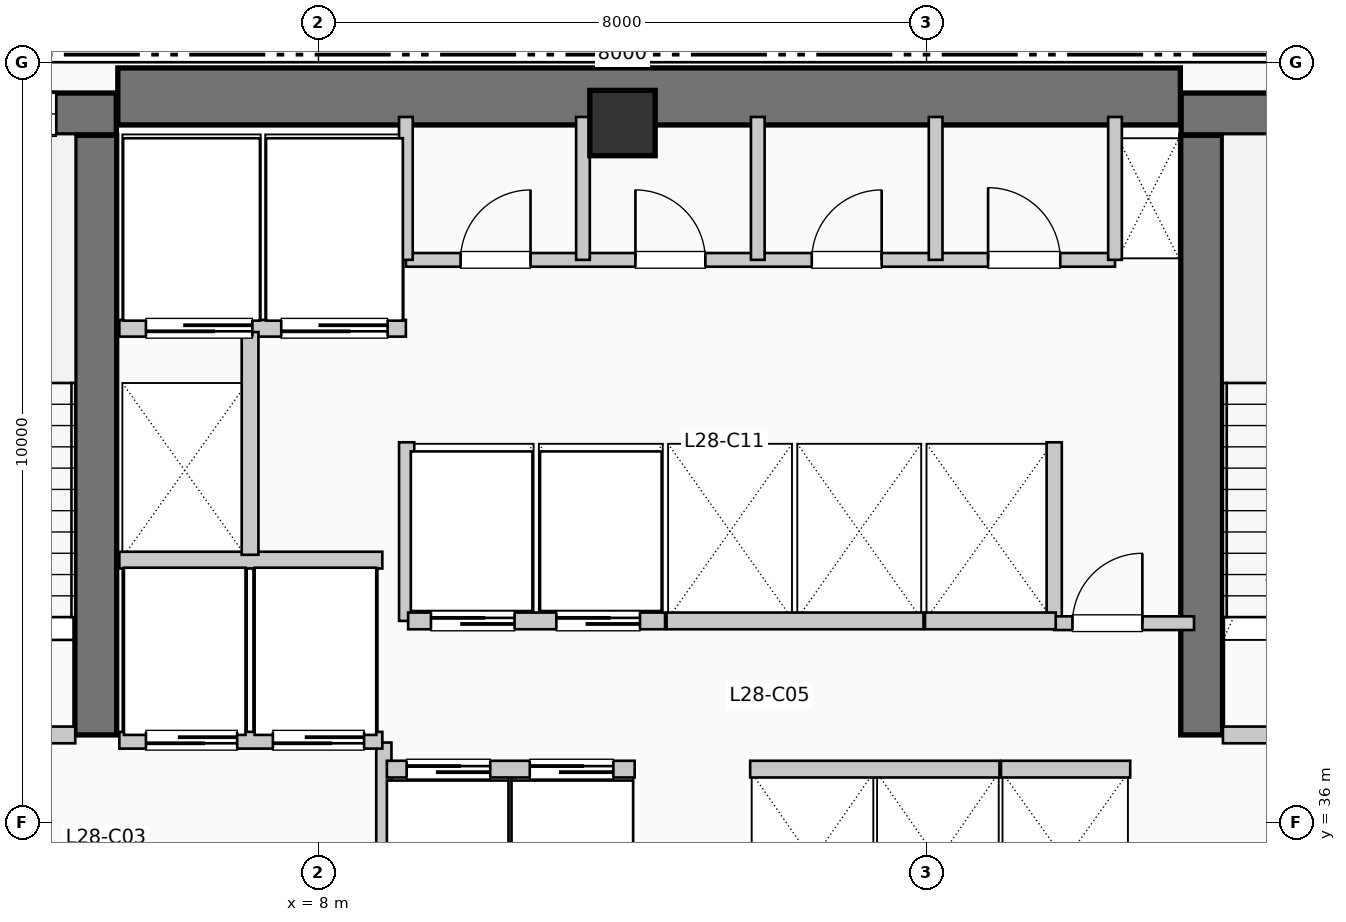
"""IFC4 building model, lengths in metres.
Left out: names, types, materials, properties, quantities, classifications, styles, units other than length and angle.
Written with IfcOpenShell. Run it as: python <this file> out.ifc"""

import sys

from ifc_helpers import new_model, si_unit, direction, frame, frame_2d, origin, origin_2d, place, context, subcontext, project, spatial, rectangle, extrude, element, fill, save


model = new_model("IFC4")
c1 = context("Model", 3, precision=1e-05, world=origin(), true_north=direction((0.0, 1.0)))
c2 = subcontext(c1, "Body", "Model", "MODEL_VIEW")
j1 = project(units=[si_unit("LENGTHUNIT", "METRE"), si_unit("PLANEANGLEUNIT", "RADIAN")], contexts=[c1])
p1 = place(None, origin())
s1 = spatial("IfcSite", under=j1, at=p1, CompositionType="ELEMENT")
p2 = place(p1, origin())
s2 = spatial("IfcBuilding", under=s1, at=p2, CompositionType="ELEMENT")
p3 = place(p2, frame((0.0, 0.0, 118.47)))
s3 = spatial("IfcBuildingStorey", under=s2, at=p3, CompositionType="ELEMENT", Elevation=118.47)
p4 = place(p3, frame((5.36, 45.55, 0.0), z_axis=(0.0, 0.0, 1.0), x_axis=(1.0, 0.0, 0.0)))
e1 = element("IfcWall", 1, at=p4, inside=s3, PredefinedType="SHEAR", context=c2, shape_type="SweptSolid", body=[
    extrude(rectangle(XDim=13.98, YDim=0.75, at=frame_2d((6.99, 0.0))), origin(), (0.0, 0.0, 1.0), 3.96),
])
p5 = place(p3, frame((5.07, 37.15, 0.0), z_axis=(0.0, 0.0, 1.0), x_axis=(0.0, 1.0, 0.0)))
e2 = element("IfcWall", 2, at=p5, inside=s3, PredefinedType="SHEAR", context=c2, shape_type="SweptSolid", body=[
    extrude(rectangle(XDim=7.89, YDim=0.55, at=frame_2d((3.945, 0.0))), origin(), (0.0, 0.0, 1.0), 3.96),
])
p6 = place(p3, frame((1.1, 45.32, 0.0), z_axis=(0.0, 0.0, 1.0), x_axis=(1.0, 0.0, 0.0)))
e3 = element("IfcWall", 3, at=p6, inside=s3, PredefinedType="SHEAR", context=c2, shape_type="SweptSolid", body=[
    extrude(rectangle(XDim=4.24, YDim=0.55, at=frame_2d((2.12, 0.0))), origin(), (0.0, 0.0, 1.0), 3.96),
])
p7 = place(p6, frame((2.05, 0.0, 1.05)))
e4 = element("IfcOpeningElement", 4, at=p7, cuts=e3, PredefinedType="OPENING", context=c2, shape_type="SweptSolid", body=[
    extrude(rectangle(XDim=1.4, YDim=1.8, at=frame_2d((0.7, 0.9))), frame((0.0, 0.285, 0.0), z_axis=(0.0, -1.0, 0.0), x_axis=(1.0, 0.0, 0.0)), (0.0, 0.0, 1.0), 0.57),
])
p8 = place(p3, frame((19.62, 37.15, 0.0), z_axis=(0.0, 0.0, 1.0), x_axis=(0.0, 1.0, 0.0)))
e5 = element("IfcWall", 5, at=p8, inside=s3, PredefinedType="SHEAR", context=c2, shape_type="SweptSolid", body=[
    extrude(rectangle(XDim=7.89, YDim=0.55, at=frame_2d((3.945, 0.0))), origin(), (0.0, 0.0, 1.0), 3.96),
])
p9 = place(p3, frame((19.35, 45.32, 0.0), z_axis=(0.0, 0.0, 1.0), x_axis=(1.0, 0.0, 0.0)))
e6 = element("IfcWall", 6, at=p9, inside=s3, PredefinedType="SHEAR", context=c2, shape_type="SweptSolid", body=[
    extrude(rectangle(XDim=3.69, YDim=0.55, at=frame_2d((1.845, 0.0))), origin(), (0.0, 0.0, 1.0), 3.96),
])
p10 = place(p9, frame((1.15, 0.0, 1.05)))
e7 = element("IfcOpeningElement", 7, at=p10, cuts=e6, PredefinedType="OPENING", context=c2, shape_type="SweptSolid", body=[
    extrude(rectangle(XDim=1.4, YDim=1.8, at=frame_2d((0.7, 0.9))), frame((0.0, 0.285, 0.0), z_axis=(0.0, -1.0, 0.0), x_axis=(1.0, 0.0, 0.0)), (0.0, 0.0, 1.0), 0.57),
])
p11 = place(p3, frame((12.0, 45.2, 0.0), z_axis=(0.0, 0.0, 1.0), x_axis=(1.0, 0.0, 0.0)))
e8 = element("IfcColumn", 8, at=p11, inside=s3, PredefinedType="COLUMN", context=c2, shape_type="SweptSolid", body=[
    extrude(rectangle(XDim=0.86, YDim=0.86, at=origin_2d()), origin(), (0.0, 0.0, 1.0), 3.96),
])
p12 = place(p3, frame((1.65, 37.15, 0.0), z_axis=(0.0, 0.0, 1.0), x_axis=(1.0, 0.0, 0.0)))
e9 = element("IfcWall", 9, at=p12, inside=s3, PredefinedType="PARTITIONING", context=c2, shape_type="SweptSolid", body=[
    extrude(rectangle(XDim=3.15, YDim=0.22, at=frame_2d((1.575, 0.0))), origin(), (0.0, 0.0, 1.0), 3.71),
])
p13 = place(p12, frame((2.05, 0.0, 0.0), z_axis=(0.0, 0.0, 1.0), x_axis=(-1.0, 0.0, 0.0)))
e10 = element("IfcOpeningElement", 10, at=p13, cuts=e9, PredefinedType="OPENING", context=c2, shape_type="SweptSolid", body=[
    extrude(rectangle(XDim=1.05, YDim=2.15, at=frame_2d((0.525, 1.075))), frame((0.0, 0.12, 0.0), z_axis=(0.0, -1.0, 0.0), x_axis=(1.0, 0.0, 0.0)), (0.0, 0.0, 1.0), 0.24),
])
p14 = place(p3, frame((8.86, 34.55, 0.0), z_axis=(0.0, 0.0, 1.0), x_axis=(0.0, 1.0, 0.0)))
e11 = element("IfcWall", 11, at=p14, inside=s3, PredefinedType="PARTITIONING", context=c2, shape_type="SweptSolid", body=[
    extrude(rectangle(XDim=2.5, YDim=0.2, at=frame_2d((1.25, 0.0))), origin(), (0.0, 0.0, 1.0), 3.71),
])
p15 = place(p3, frame((19.9, 37.15, 0.0), z_axis=(0.0, 0.0, 1.0), x_axis=(1.0, 0.0, 0.0)))
e12 = element("IfcWall", 12, at=p15, inside=s3, PredefinedType="PARTITIONING", context=c2, shape_type="SweptSolid", body=[
    extrude(rectangle(XDim=3.15, YDim=0.22, at=frame_2d((1.575, 0.0))), origin(), (0.0, 0.0, 1.0), 3.71),
])
p16 = place(p15, frame((2.05, 0.0, 0.0), z_axis=(0.0, 0.0, 1.0), x_axis=(-1.0, 0.0, 0.0)))
e13 = element("IfcOpeningElement", 13, at=p16, cuts=e12, PredefinedType="OPENING", context=c2, shape_type="SweptSolid", body=[
    extrude(rectangle(XDim=1.05, YDim=2.15, at=frame_2d((0.525, 1.075))), frame((0.0, 0.12, 0.0), z_axis=(0.0, -1.0, 0.0), x_axis=(1.0, 0.0, 0.0)), (0.0, 0.0, 1.0), 0.24),
])
p17 = place(p3, frame((5.38, 37.08, 0.0), z_axis=(0.0, 0.0, 1.0), x_axis=(1.0, 0.0, 0.0)))
e14 = element("IfcWall", 14, at=p17, inside=s3, PredefinedType="PARTITIONING", context=c2, shape_type="SweptSolid", body=[
    extrude(rectangle(XDim=3.46, YDim=0.22, at=frame_2d((1.73, 0.0))), origin(), (0.0, 0.0, 1.0), 3.71),
])
p18 = place(p17, frame((1.55, 0.0, 0.0), z_axis=(0.0, 0.0, 1.0), x_axis=(-1.0, 0.0, 0.0)))
e15 = element("IfcOpeningElement", 15, at=p18, cuts=e14, PredefinedType="OPENING", context=c2, shape_type="SweptSolid", body=[
    extrude(rectangle(XDim=1.2, YDim=2.2, at=frame_2d((0.6, 1.1))), frame((0.0, 0.12, 0.0), z_axis=(0.0, -1.0, 0.0), x_axis=(1.0, 0.0, 0.0)), (0.0, 0.0, 1.0), 0.24),
])
p19 = place(p17, frame((3.22, 0.0, 0.0), z_axis=(0.0, 0.0, 1.0), x_axis=(-1.0, 0.0, 0.0)))
e16 = element("IfcOpeningElement", 16, at=p19, cuts=e14, PredefinedType="OPENING", context=c2, shape_type="SweptSolid", body=[
    extrude(rectangle(XDim=1.2, YDim=2.2, at=frame_2d((0.6, 1.1))), frame((0.0, 0.12, 0.0), z_axis=(0.0, -1.0, 0.0), x_axis=(1.0, 0.0, 0.0)), (0.0, 0.0, 1.0), 0.24),
])
p20 = place(p3, frame((5.38, 39.45, 0.0), z_axis=(0.0, 0.0, 1.0), x_axis=(1.0, 0.0, 0.0)))
e17 = element("IfcWall", 17, at=p20, inside=s3, PredefinedType="PARTITIONING", context=c2, shape_type="SweptSolid", body=[
    extrude(rectangle(XDim=3.46, YDim=0.22, at=frame_2d((1.73, 0.0))), origin(), (0.0, 0.0, 1.0), 3.71),
])
p21 = place(p3, frame((5.38, 42.5, 0.0), z_axis=(0.0, 0.0, 1.0), x_axis=(1.0, 0.0, 0.0)))
e18 = element("IfcWall", 18, at=p21, inside=s3, PredefinedType="PARTITIONING", context=c2, shape_type="SweptSolid", body=[
    extrude(rectangle(XDim=3.77, YDim=0.22, at=frame_2d((1.885, 0.0))), origin(), (0.0, 0.0, 1.0), 3.71),
])
p22 = place(p21, frame((1.75, 0.0, 0.0), z_axis=(0.0, 0.0, 1.0), x_axis=(-1.0, 0.0, 0.0)))
e19 = element("IfcOpeningElement", 19, at=p22, cuts=e18, PredefinedType="OPENING", context=c2, shape_type="SweptSolid", body=[
    extrude(rectangle(XDim=1.4, YDim=2.2, at=frame_2d((0.7, 1.1))), frame((0.0, 0.12, 0.0), z_axis=(0.0, -1.0, 0.0), x_axis=(1.0, 0.0, 0.0)), (0.0, 0.0, 1.0), 0.24),
])
p23 = place(p21, frame((3.53, 0.0, 0.0), z_axis=(0.0, 0.0, 1.0), x_axis=(-1.0, 0.0, 0.0)))
e20 = element("IfcOpeningElement", 20, at=p23, cuts=e18, PredefinedType="OPENING", context=c2, shape_type="SweptSolid", body=[
    extrude(rectangle(XDim=1.4, YDim=2.2, at=frame_2d((0.7, 1.1))), frame((0.0, 0.12, 0.0), z_axis=(0.0, -1.0, 0.0), x_axis=(1.0, 0.0, 0.0)), (0.0, 0.0, 1.0), 0.24),
])
p24 = place(p3, frame((7.1, 39.52, 0.0), z_axis=(0.0, 0.0, 1.0), x_axis=(0.0, 1.0, 0.0)))
e21 = element("IfcWall", 21, at=p24, inside=s3, PredefinedType="PARTITIONING", context=c2, shape_type="SweptSolid", body=[
    extrude(rectangle(XDim=2.93, YDim=0.22, at=frame_2d((1.465, 0.0))), origin(), (0.0, 0.0, 1.0), 3.71),
])
for number, where, z_axis, x_axis in (
    (22, (9.16, 38.65, 0.0), (0.0, 0.0, 1.0), (0.0, 1.0, 0.0)),
    (23, (17.68, 38.65, 0.0), (0.0, 0.0, 1.0), (0.0, 1.0, 0.0)),
):
    element("IfcWall", number, at=place(p3, frame(where, z_axis=z_axis, x_axis=x_axis)), inside=s3, PredefinedType="PARTITIONING", context=c2, shape_type="SweptSolid", body=[
        extrude(rectangle(XDim=2.35, YDim=0.2, at=frame_2d((1.175, 0.0))), origin(), (0.0, 0.0, 1.0), 3.71),
    ])
p25 = place(p3, frame((17.68, 38.62, 0.0), z_axis=(0.0, 0.0, 1.0), x_axis=(1.0, 0.0, 0.0)))
e24 = element("IfcWall", 24, at=p25, inside=s3, PredefinedType="PARTITIONING", context=c2, shape_type="SweptSolid", body=[
    extrude(rectangle(XDim=1.84, YDim=0.18, at=frame_2d((0.92, 0.0))), origin(), (0.0, 0.0, 1.0), 3.71),
])
p26 = place(p25, frame((0.24, 0.0, 0.0)))
e25 = element("IfcOpeningElement", 25, at=p26, cuts=e24, PredefinedType="OPENING", context=c2, shape_type="SweptSolid", body=[
    extrude(rectangle(XDim=0.92, YDim=2.1, at=frame_2d((0.46, 1.05))), frame((0.0, 0.1, 0.0), z_axis=(0.0, -1.0, 0.0), x_axis=(1.0, 0.0, 0.0)), (0.0, 0.0, 1.0), 0.2),
])
p27 = place(p3, frame((8.9, 36.7, 0.0), z_axis=(0.0, 0.0, 1.0), x_axis=(1.0, 0.0, 0.0)))
e26 = element("IfcWall", 26, at=p27, inside=s3, PredefinedType="PARTITIONING", context=c2, shape_type="SweptSolid", body=[
    extrude(rectangle(XDim=3.26, YDim=0.22, at=frame_2d((1.63, 0.0))), origin(), (0.0, 0.0, 1.0), 3.71),
])
p28 = place(p27, frame((0.26, 0.0, 0.0)))
e27 = element("IfcOpeningElement", 27, at=p28, cuts=e26, PredefinedType="OPENING", context=c2, shape_type="SweptSolid", body=[
    extrude(rectangle(XDim=1.1, YDim=2.2, at=frame_2d((0.55, 1.1))), frame((0.0, 0.12, 0.0), z_axis=(0.0, -1.0, 0.0), x_axis=(1.0, 0.0, 0.0)), (0.0, 0.0, 1.0), 0.24),
])
p29 = place(p27, frame((1.88, 0.0, 0.0)))
e28 = element("IfcOpeningElement", 28, at=p29, cuts=e26, PredefinedType="OPENING", context=c2, shape_type="SweptSolid", body=[
    extrude(rectangle(XDim=1.1, YDim=2.2, at=frame_2d((0.55, 1.1))), frame((0.0, 0.12, 0.0), z_axis=(0.0, -1.0, 0.0), x_axis=(1.0, 0.0, 0.0)), (0.0, 0.0, 1.0), 0.24),
])
p30 = place(p3, frame((9.18, 38.65, 0.0), z_axis=(0.0, 0.0, 1.0), x_axis=(1.0, 0.0, 0.0)))
e29 = element("IfcWall", 29, at=p30, inside=s3, PredefinedType="PARTITIONING", context=c2, shape_type="SweptSolid", body=[
    extrude(rectangle(XDim=3.38, YDim=0.22, at=frame_2d((1.69, 0.0))), origin(), (0.0, 0.0, 1.0), 3.71),
])
p31 = place(p30, frame((0.3, 0.0, 0.0)))
e30 = element("IfcOpeningElement", 30, at=p31, cuts=e29, PredefinedType="OPENING", context=c2, shape_type="SweptSolid", body=[
    extrude(rectangle(XDim=1.1, YDim=2.2, at=frame_2d((0.55, 1.1))), frame((0.0, 0.12, 0.0), z_axis=(0.0, -1.0, 0.0), x_axis=(1.0, 0.0, 0.0)), (0.0, 0.0, 1.0), 0.24),
])
p32 = place(p30, frame((1.95, 0.0, 0.0)))
e31 = element("IfcOpeningElement", 31, at=p32, cuts=e29, PredefinedType="OPENING", context=c2, shape_type="SweptSolid", body=[
    extrude(rectangle(XDim=1.1, YDim=2.2, at=frame_2d((0.55, 1.1))), frame((0.0, 0.12, 0.0), z_axis=(0.0, -1.0, 0.0), x_axis=(1.0, 0.0, 0.0)), (0.0, 0.0, 1.0), 0.24),
])
p33 = place(p3, frame((13.68, 36.7, 0.0), z_axis=(0.0, 0.0, 1.0), x_axis=(1.0, 0.0, 0.0)))
e32 = element("IfcWall", 32, at=p33, inside=s3, PredefinedType="PARTITIONING", context=c2, shape_type="SweptSolid", body=[
    extrude(rectangle(XDim=3.28, YDim=0.22, at=frame_2d((1.64, 0.0))), origin(), (0.0, 0.0, 1.0), 3.71),
])
p34 = place(p3, frame((12.58, 38.65, 0.0), z_axis=(0.0, 0.0, 1.0), x_axis=(1.0, 0.0, 0.0)))
e33 = element("IfcWall", 33, at=p34, inside=s3, PredefinedType="PARTITIONING", context=c2, shape_type="SweptSolid", body=[
    extrude(rectangle(XDim=3.38, YDim=0.22, at=frame_2d((1.69, 0.0))), origin(), (0.0, 0.0, 1.0), 3.71),
])
p35 = place(p3, frame((16.98, 36.7, 0.0), z_axis=(0.0, 0.0, 1.0), x_axis=(1.0, 0.0, 0.0)))
e34 = element("IfcWall", 34, at=p35, inside=s3, PredefinedType="PARTITIONING", context=c2, shape_type="SweptSolid", body=[
    extrude(rectangle(XDim=1.7, YDim=0.22, at=frame_2d((0.85, 0.0))), origin(), (0.0, 0.0, 1.0), 3.71),
])
p36 = place(p3, frame((15.98, 38.65, 0.0), z_axis=(0.0, 0.0, 1.0), x_axis=(1.0, 0.0, 0.0)))
e35 = element("IfcWall", 35, at=p36, inside=s3, PredefinedType="PARTITIONING", context=c2, shape_type="SweptSolid", body=[
    extrude(rectangle(XDim=1.72, YDim=0.22, at=frame_2d((0.86, 0.0))), origin(), (0.0, 0.0, 1.0), 3.71),
])
p37 = place(p3, frame((9.15, 43.4, 0.0), z_axis=(0.0, 0.0, 1.0), x_axis=(1.0, 0.0, 0.0)))
e36 = element("IfcWall", 36, at=p37, inside=s3, PredefinedType="PLUMBINGWALL", context=c2, shape_type="SweptSolid", body=[
    extrude(rectangle(XDim=9.33, YDim=0.18, at=frame_2d((4.665, 0.0))), origin(), (0.0, 0.0, 1.0), 3.71),
])
p38 = place(p37, frame((0.72, 0.0, 0.0)))
e37 = element("IfcOpeningElement", 37, at=p38, cuts=e36, PredefinedType="OPENING", context=c2, shape_type="SweptSolid", body=[
    extrude(rectangle(XDim=0.92, YDim=2.1, at=frame_2d((0.46, 1.05))), frame((0.0, 0.1, 0.0), z_axis=(0.0, -1.0, 0.0), x_axis=(1.0, 0.0, 0.0)), (0.0, 0.0, 1.0), 0.2),
])
p39 = place(p37, frame((3.02, 0.0, 0.0)))
e38 = element("IfcOpeningElement", 38, at=p39, cuts=e36, PredefinedType="OPENING", context=c2, shape_type="SweptSolid", body=[
    extrude(rectangle(XDim=0.92, YDim=2.1, at=frame_2d((0.46, 1.05))), frame((0.0, 0.1, 0.0), z_axis=(0.0, -1.0, 0.0), x_axis=(1.0, 0.0, 0.0)), (0.0, 0.0, 1.0), 0.2),
])
p40 = place(p37, frame((5.34, 0.0, 0.0)))
e39 = element("IfcOpeningElement", 39, at=p40, cuts=e36, PredefinedType="OPENING", context=c2, shape_type="SweptSolid", body=[
    extrude(rectangle(XDim=0.92, YDim=2.1, at=frame_2d((0.46, 1.05))), frame((0.0, 0.1, 0.0), z_axis=(0.0, -1.0, 0.0), x_axis=(1.0, 0.0, 0.0)), (0.0, 0.0, 1.0), 0.2),
])
p41 = place(p37, frame((7.66, 0.0, 0.0)))
e40 = element("IfcOpeningElement", 40, at=p41, cuts=e36, PredefinedType="OPENING", context=c2, shape_type="SweptSolid", body=[
    extrude(rectangle(XDim=0.95, YDim=2.1, at=frame_2d((0.475, 1.05))), frame((0.0, 0.1, 0.0), z_axis=(0.0, -1.0, 0.0), x_axis=(1.0, 0.0, 0.0)), (0.0, 0.0, 1.0), 0.2),
])
for number, where, z_axis, x_axis in (
    (41, (9.15, 43.4, 0.0), (0.0, 0.0, 1.0), (0.0, 1.0, 0.0)),
    (42, (18.48, 43.4, 0.0), (0.0, 0.0, 1.0), (0.0, 1.0, 0.0)),
    (43, (11.48, 43.4, 0.0), (0.0, 0.0, 1.0), (0.0, 1.0, 0.0)),
    (44, (13.78, 43.4, 0.0), (0.0, 0.0, 1.0), (0.0, 1.0, 0.0)),
    (45, (16.12, 43.4, 0.0), (0.0, 0.0, 1.0), (0.0, 1.0, 0.0)),
):
    element("IfcWall", number, at=place(p3, frame(where, z_axis=z_axis, x_axis=x_axis)), inside=s3, PredefinedType="PLUMBINGWALL", context=c2, shape_type="SweptSolid", body=[
        extrude(rectangle(XDim=1.88, YDim=0.18, at=frame_2d((0.94, 0.0))), origin(), (0.0, 0.0, 1.0), 3.71),
    ])
p42 = place(p7, origin())
e46 = element("IfcWindow", 46, at=p42, inside=s3, PartitioningType="SINGLE_PANEL", PredefinedType="WINDOW", context=c2, shape_type="SweptSolid", body=[
    extrude(rectangle(XDim=1.4, YDim=1.8, at=frame_2d((0.7, 0.9))), frame((0.0, 0.03, 0.0), z_axis=(0.0, -1.0, 0.0), x_axis=(1.0, 0.0, 0.0)), (0.0, 0.0, 1.0), 0.06),
])
fill(e4, e46)
p43 = place(p18, origin())
e47 = element("IfcDoor", 47, at=p43, inside=s3, OperationType="SLIDING_TO_RIGHT", PredefinedType="DOOR", context=c2, shape_type="SweptSolid", body=[
    extrude(rectangle(XDim=1.2, YDim=2.2, at=frame_2d((0.6, 1.1))), frame((0.0, 0.025, 0.0), z_axis=(0.0, -1.0, 0.0), x_axis=(1.0, 0.0, 0.0)), (0.0, 0.0, 1.0), 0.05),
])
fill(e15, e47)
p44 = place(p19, origin())
e48 = element("IfcDoor", 48, at=p44, inside=s3, OperationType="SLIDING_TO_RIGHT", PredefinedType="DOOR", context=c2, shape_type="SweptSolid", body=[
    extrude(rectangle(XDim=1.2, YDim=2.2, at=frame_2d((0.6, 1.1))), frame((0.0, 0.025, 0.0), z_axis=(0.0, -1.0, 0.0), x_axis=(1.0, 0.0, 0.0)), (0.0, 0.0, 1.0), 0.05),
])
fill(e16, e48)
p45 = place(p22, origin())
e49 = element("IfcDoor", 49, at=p45, inside=s3, OperationType="SLIDING_TO_LEFT", PredefinedType="DOOR", context=c2, shape_type="SweptSolid", body=[
    extrude(rectangle(XDim=1.4, YDim=2.2, at=frame_2d((0.7, 1.1))), frame((0.0, 0.025, 0.0), z_axis=(0.0, -1.0, 0.0), x_axis=(1.0, 0.0, 0.0)), (0.0, 0.0, 1.0), 0.05),
])
fill(e19, e49)
p46 = place(p23, origin())
e50 = element("IfcDoor", 50, at=p46, inside=s3, OperationType="SLIDING_TO_LEFT", PredefinedType="DOOR", context=c2, shape_type="SweptSolid", body=[
    extrude(rectangle(XDim=1.4, YDim=2.2, at=frame_2d((0.7, 1.1))), frame((0.0, 0.025, 0.0), z_axis=(0.0, -1.0, 0.0), x_axis=(1.0, 0.0, 0.0)), (0.0, 0.0, 1.0), 0.05),
])
fill(e20, e50)
p47 = place(p26, origin())
e51 = element("IfcDoor", 51, at=p47, inside=s3, OperationType="SINGLE_SWING_RIGHT", PredefinedType="DOOR", context=c2, shape_type="SweptSolid", body=[
    extrude(rectangle(XDim=0.92, YDim=2.1, at=frame_2d((0.46, 1.05))), frame((0.0, 0.025, 0.0), z_axis=(0.0, -1.0, 0.0), x_axis=(1.0, 0.0, 0.0)), (0.0, 0.0, 1.0), 0.05),
])
fill(e25, e51)
p48 = place(p28, origin())
e52 = element("IfcDoor", 52, at=p48, inside=s3, OperationType="SLIDING_TO_LEFT", PredefinedType="DOOR", context=c2, shape_type="SweptSolid", body=[
    extrude(rectangle(XDim=1.1, YDim=2.2, at=frame_2d((0.55, 1.1))), frame((0.0, 0.025, 0.0), z_axis=(0.0, -1.0, 0.0), x_axis=(1.0, 0.0, 0.0)), (0.0, 0.0, 1.0), 0.05),
])
fill(e27, e52)
p49 = place(p29, origin())
e53 = element("IfcDoor", 53, at=p49, inside=s3, OperationType="SLIDING_TO_LEFT", PredefinedType="DOOR", context=c2, shape_type="SweptSolid", body=[
    extrude(rectangle(XDim=1.1, YDim=2.2, at=frame_2d((0.55, 1.1))), frame((0.0, 0.025, 0.0), z_axis=(0.0, -1.0, 0.0), x_axis=(1.0, 0.0, 0.0)), (0.0, 0.0, 1.0), 0.05),
])
fill(e28, e53)
p50 = place(p31, origin())
e54 = element("IfcDoor", 54, at=p50, inside=s3, OperationType="SLIDING_TO_LEFT", PredefinedType="DOOR", context=c2, shape_type="SweptSolid", body=[
    extrude(rectangle(XDim=1.1, YDim=2.2, at=frame_2d((0.55, 1.1))), frame((0.0, 0.025, 0.0), z_axis=(0.0, -1.0, 0.0), x_axis=(1.0, 0.0, 0.0)), (0.0, 0.0, 1.0), 0.05),
])
fill(e30, e54)
p51 = place(p32, origin())
e55 = element("IfcDoor", 55, at=p51, inside=s3, OperationType="SLIDING_TO_LEFT", PredefinedType="DOOR", context=c2, shape_type="SweptSolid", body=[
    extrude(rectangle(XDim=1.1, YDim=2.2, at=frame_2d((0.55, 1.1))), frame((0.0, 0.025, 0.0), z_axis=(0.0, -1.0, 0.0), x_axis=(1.0, 0.0, 0.0)), (0.0, 0.0, 1.0), 0.05),
])
fill(e31, e55)
p52 = place(p38, origin())
e56 = element("IfcDoor", 56, at=p52, inside=s3, OperationType="SINGLE_SWING_RIGHT", PredefinedType="DOOR", context=c2, shape_type="SweptSolid", body=[
    extrude(rectangle(XDim=0.92, YDim=2.1, at=frame_2d((0.46, 1.05))), frame((0.0, 0.025, 0.0), z_axis=(0.0, -1.0, 0.0), x_axis=(1.0, 0.0, 0.0)), (0.0, 0.0, 1.0), 0.05),
])
fill(e37, e56)
p53 = place(p39, origin())
e57 = element("IfcDoor", 57, at=p53, inside=s3, OperationType="SINGLE_SWING_LEFT", PredefinedType="DOOR", context=c2, shape_type="SweptSolid", body=[
    extrude(rectangle(XDim=0.92, YDim=2.1, at=frame_2d((0.46, 1.05))), frame((0.0, 0.025, 0.0), z_axis=(0.0, -1.0, 0.0), x_axis=(1.0, 0.0, 0.0)), (0.0, 0.0, 1.0), 0.05),
])
fill(e38, e57)
p54 = place(p40, origin())
e58 = element("IfcDoor", 58, at=p54, inside=s3, OperationType="SINGLE_SWING_RIGHT", PredefinedType="DOOR", context=c2, shape_type="SweptSolid", body=[
    extrude(rectangle(XDim=0.92, YDim=2.1, at=frame_2d((0.46, 1.05))), frame((0.0, 0.025, 0.0), z_axis=(0.0, -1.0, 0.0), x_axis=(1.0, 0.0, 0.0)), (0.0, 0.0, 1.0), 0.05),
])
fill(e39, e58)
p55 = place(p41, origin())
e59 = element("IfcDoor", 59, at=p55, inside=s3, OperationType="SINGLE_SWING_LEFT", PredefinedType="DOOR", context=c2, shape_type="SweptSolid", body=[
    extrude(rectangle(XDim=0.95, YDim=2.1, at=frame_2d((0.475, 1.05))), frame((0.0, 0.025, 0.0), z_axis=(0.0, -1.0, 0.0), x_axis=(1.0, 0.0, 0.0)), (0.0, 0.0, 1.0), 0.05),
])
fill(e40, e59)
save(model, sys.argv[1])
